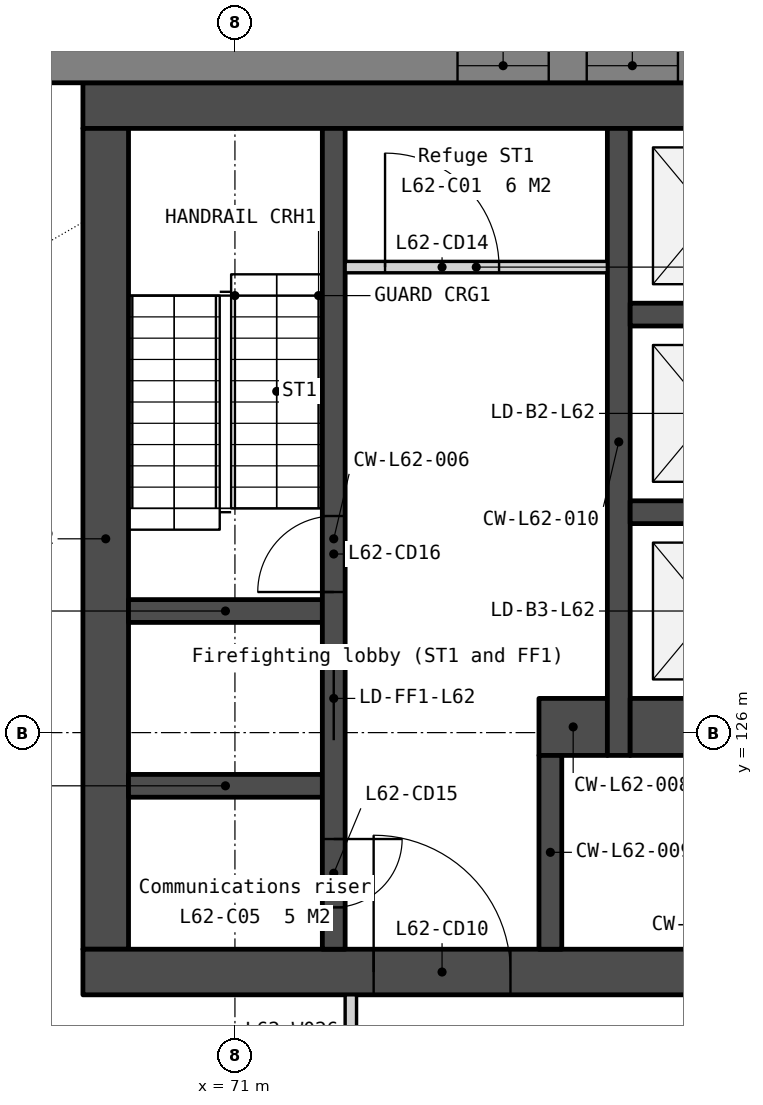
"""IFC4 building model, lengths in metres.
Left out: names, types, materials, properties, quantities, classifications, styles, units other than length and angle.
Written with IfcOpenShell. Run it as: python <this file> out.ifc"""

import sys

from ifc_helpers import new_model, si_unit, direction, frame, frame_2d, origin, place, context, subcontext, project, spatial, polyline, rectangle, outline, extrude, element, fill, save


model = new_model("IFC4")
c1 = context("Model", 3, precision=1e-05, world=origin(), true_north=direction((0.0, 1.0)))
c2 = subcontext(c1, "Body", "Model", "MODEL_VIEW")
j1 = project(units=[si_unit("LENGTHUNIT", "METRE"), si_unit("PLANEANGLEUNIT", "RADIAN")], contexts=[c1])
p1 = place(None, origin())
s1 = spatial("IfcSite", under=j1, at=p1, CompositionType="ELEMENT")
p2 = place(p1, origin())
s2 = spatial("IfcBuilding", under=s1, at=p2, CompositionType="ELEMENT")
p3 = place(p2, frame((0.0, 0.0, 254.3)))
s3 = spatial("IfcBuildingStorey", under=s2, at=p3, CompositionType="ELEMENT", Elevation=254.3)
p4 = place(p3, frame((69.0, 134.25, 0.0), z_axis=(0.0, 0.0, 1.0), x_axis=(1.0, 0.0, 0.0)))
e1 = element("IfcWall", 1, at=p4, inside=s3, PredefinedType="SOLIDWALL", context=c2, shape_type="SweptSolid", body=[
    extrude(rectangle(XDim=22.0, YDim=0.6, at=frame_2d((11.0, 0.0))), origin(), (0.0, 0.0, 1.0), 3.75),
])
p5 = place(p3, frame((69.3, 133.95, 0.0), z_axis=(0.0, 0.0, 1.0), x_axis=(0.0, -1.0, 0.0)))
e2 = element("IfcWall", 2, at=p5, inside=s3, PredefinedType="SOLIDWALL", context=c2, shape_type="SweptSolid", body=[
    extrude(rectangle(XDim=10.8, YDim=0.6, at=frame_2d((5.4, 0.0))), origin(), (0.0, 0.0, 1.0), 3.75),
])
p6 = place(p3, frame((69.0, 122.85, 0.0), z_axis=(0.0, 0.0, 1.0), x_axis=(1.0, 0.0, 0.0)))
e3 = element("IfcWall", 3, at=p6, inside=s3, PredefinedType="SOLIDWALL", context=c2, shape_type="SweptSolid", body=[
    extrude(rectangle(XDim=22.0, YDim=0.6, at=frame_2d((11.0, 0.0))), origin(), (0.0, 0.0, 1.0), 3.75),
])
p7 = place(p6, frame((16.375, 0.0, 0.0)))
e4 = element("IfcOpeningElement", 4, at=p7, cuts=e3, PredefinedType="OPENING", context=c2, shape_type="SweptSolid", body=[
    extrude(rectangle(XDim=1.8, YDim=2.1, at=frame_2d((0.9, 1.05))), frame((0.0, 0.31, 0.0), z_axis=(0.0, -1.0, 0.0), x_axis=(1.0, 0.0, 0.0)), (0.0, 0.0, 1.0), 0.62),
])
p8 = place(p6, frame((3.825, 0.0, 0.0)))
e5 = element("IfcOpeningElement", 5, at=p8, cuts=e3, PredefinedType="OPENING", context=c2, shape_type="SweptSolid", body=[
    extrude(rectangle(XDim=1.8, YDim=2.1, at=frame_2d((0.9, 1.05))), frame((0.0, 0.31, 0.0), z_axis=(0.0, -1.0, 0.0), x_axis=(1.0, 0.0, 0.0)), (0.0, 0.0, 1.0), 0.62),
])
p9 = place(p6, frame((12.85, 0.0, 0.0)))
e6 = element("IfcOpeningElement", 6, at=p9, cuts=e3, PredefinedType="OPENING", context=c2, shape_type="SweptSolid", body=[
    extrude(rectangle(XDim=1.5, YDim=2.1, at=frame_2d((0.75, 1.05))), frame((0.0, 0.31, 0.0), z_axis=(0.0, -1.0, 0.0), x_axis=(1.0, 0.0, 0.0)), (0.0, 0.0, 1.0), 0.62),
])
for number, where, z_axis, x_axis in (
    (7, (69.6, 127.6, 0.0), (0.0, 0.0, 1.0), (1.0, 0.0, 0.0)),
    (8, (69.6, 125.3, 0.0), (0.0, 0.0, 1.0), (1.0, 0.0, 0.0)),
):
    element("IfcWall", number, at=place(p3, frame(where, z_axis=z_axis, x_axis=x_axis)), inside=s3, PredefinedType="SOLIDWALL", context=c2, shape_type="SweptSolid", body=[
        extrude(rectangle(XDim=2.55, YDim=0.3, at=frame_2d((1.275, 0.0))), origin(), (0.0, 0.0, 1.0), 3.75),
    ])
p10 = place(p3, frame((72.3, 133.95, 0.0), z_axis=(0.0, 0.0, 1.0), x_axis=(0.0, -1.0, 0.0)))
e9 = element("IfcWall", 9, at=p10, inside=s3, PredefinedType="SOLIDWALL", context=c2, shape_type="SweptSolid", body=[
    extrude(rectangle(XDim=10.8, YDim=0.3, at=frame_2d((5.4, 0.0))), origin(), (0.0, 0.0, 1.0), 3.75),
])
p11 = place(p10, frame((6.95, 0.0, 0.0)))
e10 = element("IfcOpeningElement", 10, at=p11, cuts=e9, PredefinedType="OPENING", context=c2, shape_type="SweptSolid", body=[
    extrude(rectangle(XDim=1.1, YDim=2.1, at=frame_2d((0.55, 1.05))), frame((0.0, 0.16, 0.0), z_axis=(0.0, -1.0, 0.0), x_axis=(1.0, 0.0, 0.0)), (0.0, 0.0, 1.0), 0.32),
])
p12 = place(p10, frame((9.35, 0.0, 0.0)))
e11 = element("IfcOpeningElement", 11, at=p12, cuts=e9, PredefinedType="OPENING", context=c2, shape_type="SweptSolid", body=[
    extrude(rectangle(XDim=0.9, YDim=2.1, at=frame_2d((0.45, 1.05))), frame((0.0, 0.16, 0.0), z_axis=(0.0, -1.0, 0.0), x_axis=(1.0, 0.0, 0.0)), (0.0, 0.0, 1.0), 0.32),
])
p13 = place(p10, frame((5.1, 0.0, 0.0)))
e12 = element("IfcOpeningElement", 12, at=p13, cuts=e9, PredefinedType="OPENING", context=c2, shape_type="SweptSolid", body=[
    extrude(rectangle(XDim=1.0, YDim=2.1, at=frame_2d((0.5, 1.05))), frame((0.0, 0.16, 0.0), z_axis=(0.0, -1.0, 0.0), x_axis=(1.0, 0.0, 0.0)), (0.0, 0.0, 1.0), 0.32),
])
p14 = place(p3, frame((72.45, 132.125, 0.0), z_axis=(0.0, 0.0, 1.0), x_axis=(1.0, 0.0, 0.0)))
e13 = element("IfcWall", 13, at=p14, inside=s3, PredefinedType="PARTITIONING", context=c2, shape_type="SweptSolid", body=[
    extrude(rectangle(XDim=3.45, YDim=0.15, at=frame_2d((1.725, 0.0))), origin(), (0.0, 0.0, 1.0), 3.75),
])
p15 = place(p14, frame((0.525, 0.0, 0.0)))
e14 = element("IfcOpeningElement", 14, at=p15, cuts=e13, PredefinedType="OPENING", context=c2, shape_type="SweptSolid", body=[
    extrude(rectangle(XDim=1.5, YDim=2.1, at=frame_2d((0.75, 1.05))), frame((0.0, 0.085, 0.0), z_axis=(0.0, -1.0, 0.0), x_axis=(1.0, 0.0, 0.0)), (0.0, 0.0, 1.0), 0.17),
])
p16 = place(p3, frame((75.0, 126.075, 0.0), z_axis=(0.0, 0.0, 1.0), x_axis=(1.0, 0.0, 0.0)))
e15 = element("IfcWall", 15, at=p16, inside=s3, PredefinedType="SOLIDWALL", context=c2, shape_type="SweptSolid", body=[
    extrude(rectangle(XDim=0.9, YDim=0.75, at=frame_2d((0.45, 0.0))), origin(), (0.0, 0.0, 1.0), 3.75),
])
p17 = place(p3, frame((75.15, 125.7, 0.0), z_axis=(0.0, 0.0, 1.0), x_axis=(0.0, -1.0, 0.0)))
e16 = element("IfcWall", 16, at=p17, inside=s3, PredefinedType="SOLIDWALL", context=c2, shape_type="SweptSolid", body=[
    extrude(rectangle(XDim=2.55, YDim=0.3, at=frame_2d((1.275, 0.0))), origin(), (0.0, 0.0, 1.0), 3.75),
])
p18 = place(p3, frame((76.05, 133.95, 0.0), z_axis=(0.0, 0.0, 1.0), x_axis=(0.0, -1.0, 0.0)))
e17 = element("IfcWall", 17, at=p18, inside=s3, PredefinedType="SOLIDWALL", context=c2, shape_type="SweptSolid", body=[
    extrude(rectangle(XDim=8.25, YDim=0.3, at=frame_2d((4.125, 0.0))), origin(), (0.0, 0.0, 1.0), 3.75),
])
for number, where, z_axis, x_axis in (
    (18, (76.2, 131.5, 0.0), (0.0, 0.0, 1.0), (1.0, 0.0, 0.0)),
    (19, (76.2, 128.9, 0.0), (0.0, 0.0, 1.0), (1.0, 0.0, 0.0)),
):
    element("IfcWall", number, at=place(p3, frame(where, z_axis=z_axis, x_axis=x_axis)), inside=s3, PredefinedType="SOLIDWALL", context=c2, shape_type="SweptSolid", body=[
        extrude(rectangle(XDim=2.1, YDim=0.3, at=frame_2d((1.05, 0.0))), origin(), (0.0, 0.0, 1.0), 3.75),
    ])
p19 = place(p3, frame((76.2, 126.075, 0.0), z_axis=(0.0, 0.0, 1.0), x_axis=(1.0, 0.0, 0.0)))
e20 = element("IfcWall", 20, at=p19, inside=s3, PredefinedType="SOLIDWALL", context=c2, shape_type="SweptSolid", body=[
    extrude(rectangle(XDim=2.1, YDim=0.75, at=frame_2d((1.05, 0.0))), origin(), (0.0, 0.0, 1.0), 3.75),
])
p20 = place(p3, frame((98.486, 134.775, -0.15), z_axis=(0.0, 0.0, 1.0), x_axis=(-1.0, 0.0, 0.0)))
e21 = element("IfcWall", 21, at=p20, inside=s3, PredefinedType="SOLIDWALL", context=c2, shape_type="SweptSolid", body=[
    extrude(outline(polyline([(0.0, 0.0), (0.0, 3.9), (30.551, 3.9), (30.551, 0.0), (0.0, 0.0)])), frame((0.0, 0.225, 0.0), z_axis=(0.0, -1.0, 0.0), x_axis=(1.0, 0.0, 0.0)), (0.0, 0.0, 1.0), 0.45),
])
p21 = place(p20, frame((3.172, 0.0, 0.95)))
e22 = element("IfcOpeningElement", 22, at=p21, cuts=e21, PredefinedType="OPENING", context=c2, shape_type="SweptSolid", body=[
    extrude(rectangle(XDim=1.2, YDim=2.2, at=frame_2d((0.6, 1.1))), frame((0.0, 0.235, 0.0), z_axis=(0.0, -1.0, 0.0), x_axis=(1.0, 0.0, 0.0)), (0.0, 0.0, 1.0), 0.47),
])
p22 = place(p20, frame((4.872, 0.0, 0.95)))
e23 = element("IfcOpeningElement", 23, at=p22, cuts=e21, PredefinedType="OPENING", context=c2, shape_type="SweptSolid", body=[
    extrude(rectangle(XDim=1.2, YDim=2.2, at=frame_2d((0.6, 1.1))), frame((0.0, 0.235, 0.0), z_axis=(0.0, -1.0, 0.0), x_axis=(1.0, 0.0, 0.0)), (0.0, 0.0, 1.0), 0.47),
])
p23 = place(p20, frame((12.415, 0.0, 0.95)))
e24 = element("IfcOpeningElement", 24, at=p23, cuts=e21, PredefinedType="OPENING", context=c2, shape_type="SweptSolid", body=[
    extrude(rectangle(XDim=1.2, YDim=2.2, at=frame_2d((0.6, 1.1))), frame((0.0, 0.235, 0.0), z_axis=(0.0, -1.0, 0.0), x_axis=(1.0, 0.0, 0.0)), (0.0, 0.0, 1.0), 0.47),
])
p24 = place(p20, frame((14.115, 0.0, 0.95)))
e25 = element("IfcOpeningElement", 25, at=p24, cuts=e21, PredefinedType="OPENING", context=c2, shape_type="SweptSolid", body=[
    extrude(rectangle(XDim=1.2, YDim=2.2, at=frame_2d((0.6, 1.1))), frame((0.0, 0.235, 0.0), z_axis=(0.0, -1.0, 0.0), x_axis=(1.0, 0.0, 0.0)), (0.0, 0.0, 1.0), 0.47),
])
p25 = place(p20, frame((21.658, 0.0, 0.95)))
e26 = element("IfcOpeningElement", 26, at=p25, cuts=e21, PredefinedType="OPENING", context=c2, shape_type="SweptSolid", body=[
    extrude(rectangle(XDim=1.2, YDim=2.2, at=frame_2d((0.6, 1.1))), frame((0.0, 0.235, 0.0), z_axis=(0.0, -1.0, 0.0), x_axis=(1.0, 0.0, 0.0)), (0.0, 0.0, 1.0), 0.47),
])
p26 = place(p20, frame((23.358, 0.0, 0.95)))
e27 = element("IfcOpeningElement", 27, at=p26, cuts=e21, PredefinedType="OPENING", context=c2, shape_type="SweptSolid", body=[
    extrude(rectangle(XDim=1.2, YDim=2.2, at=frame_2d((0.6, 1.1))), frame((0.0, 0.235, 0.0), z_axis=(0.0, -1.0, 0.0), x_axis=(1.0, 0.0, 0.0)), (0.0, 0.0, 1.0), 0.47),
])
p27 = place(p3, frame((60.609, 133.207, -0.15), z_axis=(0.0, 0.0, 1.0), x_axis=(0.500002536638, -0.866023939251, 0.0)))
e28 = element("IfcWall", 28, at=p27, inside=s3, PredefinedType="SOLIDWALL", context=c2, shape_type="SweptSolid", body=[
    extrude(outline(polyline([(36.972, 0.0), (36.972, 3.9), (0.0, 3.9), (0.0, 0.0), (36.972, 0.0)])), frame((0.0, 0.225, 0.0), z_axis=(0.0, -1.0, 0.0), x_axis=(1.0, 0.0, 0.0)), (0.0, 0.0, 1.0), 0.45),
])
p28 = place(p27, frame((3.172, 0.0, 0.95)))
e29 = element("IfcOpeningElement", 29, at=p28, cuts=e28, PredefinedType="OPENING", context=c2, shape_type="SweptSolid", body=[
    extrude(rectangle(XDim=1.2, YDim=2.2, at=frame_2d((0.6, 1.1))), frame((0.0, 0.235, 0.0), z_axis=(0.0, -1.0, 0.0), x_axis=(1.0, 0.0, 0.0)), (0.0, 0.0, 1.0), 0.47),
])
p29 = place(p27, frame((4.872, 0.0, 0.95)))
e30 = element("IfcOpeningElement", 30, at=p29, cuts=e28, PredefinedType="OPENING", context=c2, shape_type="SweptSolid", body=[
    extrude(rectangle(XDim=1.2, YDim=2.2, at=frame_2d((0.6, 1.1))), frame((0.0, 0.235, 0.0), z_axis=(0.0, -1.0, 0.0), x_axis=(1.0, 0.0, 0.0)), (0.0, 0.0, 1.0), 0.47),
])
p30 = place(p27, frame((12.415, 0.0, 0.95)))
e31 = element("IfcOpeningElement", 31, at=p30, cuts=e28, PredefinedType="OPENING", context=c2, shape_type="SweptSolid", body=[
    extrude(rectangle(XDim=1.2, YDim=2.2, at=frame_2d((0.6, 1.1))), frame((0.0, 0.235, 0.0), z_axis=(0.0, -1.0, 0.0), x_axis=(1.0, 0.0, 0.0)), (0.0, 0.0, 1.0), 0.47),
])
p31 = place(p27, frame((14.115, 0.0, 0.95)))
e32 = element("IfcOpeningElement", 32, at=p31, cuts=e28, PredefinedType="OPENING", context=c2, shape_type="SweptSolid", body=[
    extrude(rectangle(XDim=1.2, YDim=2.2, at=frame_2d((0.6, 1.1))), frame((0.0, 0.235, 0.0), z_axis=(0.0, -1.0, 0.0), x_axis=(1.0, 0.0, 0.0)), (0.0, 0.0, 1.0), 0.47),
])
p32 = place(p27, frame((21.658, 0.0, 0.95)))
e33 = element("IfcOpeningElement", 33, at=p32, cuts=e28, PredefinedType="OPENING", context=c2, shape_type="SweptSolid", body=[
    extrude(rectangle(XDim=1.2, YDim=2.2, at=frame_2d((0.6, 1.1))), frame((0.0, 0.235, 0.0), z_axis=(0.0, -1.0, 0.0), x_axis=(1.0, 0.0, 0.0)), (0.0, 0.0, 1.0), 0.47),
])
p33 = place(p27, frame((23.358, 0.0, 0.95)))
e34 = element("IfcOpeningElement", 34, at=p33, cuts=e28, PredefinedType="OPENING", context=c2, shape_type="SweptSolid", body=[
    extrude(rectangle(XDim=1.2, YDim=2.2, at=frame_2d((0.6, 1.1))), frame((0.0, 0.235, 0.0), z_axis=(0.0, -1.0, 0.0), x_axis=(1.0, 0.0, 0.0)), (0.0, 0.0, 1.0), 0.47),
])
p34 = place(p27, frame((30.901, 0.0, 0.95)))
e35 = element("IfcOpeningElement", 35, at=p34, cuts=e28, PredefinedType="OPENING", context=c2, shape_type="SweptSolid", body=[
    extrude(rectangle(XDim=1.2, YDim=2.2, at=frame_2d((0.6, 1.1))), frame((0.0, 0.235, 0.0), z_axis=(0.0, -1.0, 0.0), x_axis=(1.0, 0.0, 0.0)), (0.0, 0.0, 1.0), 0.47),
])
p35 = place(p27, frame((32.601, 0.0, 0.95)))
e36 = element("IfcOpeningElement", 36, at=p35, cuts=e28, PredefinedType="OPENING", context=c2, shape_type="SweptSolid", body=[
    extrude(rectangle(XDim=1.2, YDim=2.2, at=frame_2d((0.6, 1.1))), frame((0.0, 0.235, 0.0), z_axis=(0.0, -1.0, 0.0), x_axis=(1.0, 0.0, 0.0)), (0.0, 0.0, 1.0), 0.47),
])
p36 = place(p3, frame((72.525, 120.05, 0.0), z_axis=(0.0, 0.0, 1.0), x_axis=(0.0, 1.0, 0.0)))
e37 = element("IfcWall", 37, at=p36, inside=s3, PredefinedType="PARTITIONING", context=c2, shape_type="SweptSolid", body=[
    extrude(rectangle(XDim=2.5, YDim=0.15, at=frame_2d((1.25, 0.0))), origin(), (0.0, 0.0, 1.0), 3.75),
])
p37 = place(p36, frame((0.75, 0.0, 0.0)))
e38 = element("IfcOpeningElement", 38, at=p37, cuts=e37, PredefinedType="OPENING", context=c2, shape_type="SweptSolid", body=[
    extrude(rectangle(XDim=1.0, YDim=2.1, at=frame_2d((0.5, 1.05))), frame((0.0, 0.085, 0.0), z_axis=(0.0, -1.0, 0.0), x_axis=(1.0, 0.0, 0.0)), (0.0, 0.0, 1.0), 0.17),
])
p38 = place(p11, origin())
e39 = element("IfcDoor", 39, at=p38, inside=s3, OperationType="SLIDING_TO_LEFT", PredefinedType="DOOR", context=c2, shape_type="SweptSolid", body=[
    extrude(rectangle(XDim=1.1, YDim=2.1, at=frame_2d((0.55, 1.05))), frame((0.0, 0.025, 0.0), z_axis=(0.0, -1.0, 0.0), x_axis=(1.0, 0.0, 0.0)), (0.0, 0.0, 1.0), 0.05),
])
fill(e10, e39)
p39 = place(p8, origin())
e40 = element("IfcDoor", 40, at=p39, inside=s3, OperationType="DOUBLE_DOOR_DOUBLE_SWING", PredefinedType="DOOR", context=c2, shape_type="SweptSolid", body=[
    extrude(rectangle(XDim=1.8, YDim=2.1, at=frame_2d((0.9, 1.05))), frame((0.0, 0.025, 0.0), z_axis=(0.0, -1.0, 0.0), x_axis=(1.0, 0.0, 0.0)), (0.0, 0.0, 1.0), 0.05),
])
fill(e5, e40)
p40 = place(p15, origin())
e41 = element("IfcDoor", 41, at=p40, inside=s3, OperationType="DOUBLE_DOOR_DOUBLE_SWING", PredefinedType="DOOR", context=c2, shape_type="SweptSolid", body=[
    extrude(rectangle(XDim=1.5, YDim=2.1, at=frame_2d((0.75, 1.05))), frame((0.0, 0.025, 0.0), z_axis=(0.0, -1.0, 0.0), x_axis=(1.0, 0.0, 0.0)), (0.0, 0.0, 1.0), 0.05),
])
fill(e14, e41)
p41 = place(p12, origin())
e42 = element("IfcDoor", 42, at=p41, inside=s3, OperationType="SINGLE_SWING_LEFT", PredefinedType="DOOR", context=c2, shape_type="SweptSolid", body=[
    extrude(rectangle(XDim=0.9, YDim=2.1, at=frame_2d((0.45, 1.05))), frame((0.0, 0.025, 0.0), z_axis=(0.0, -1.0, 0.0), x_axis=(1.0, 0.0, 0.0)), (0.0, 0.0, 1.0), 0.05),
])
fill(e11, e42)
p42 = place(p13, origin())
e43 = element("IfcDoor", 43, at=p42, inside=s3, OperationType="SINGLE_SWING_RIGHT", PredefinedType="DOOR", context=c2, shape_type="SweptSolid", body=[
    extrude(rectangle(XDim=1.0, YDim=2.1, at=frame_2d((0.5, 1.05))), frame((0.0, 0.025, 0.0), z_axis=(0.0, -1.0, 0.0), x_axis=(1.0, 0.0, 0.0)), (0.0, 0.0, 1.0), 0.05),
])
fill(e12, e43)
p43 = place(p25, origin())
e44 = element("IfcWindow", 44, at=p43, inside=s3, PartitioningType="SINGLE_PANEL", PredefinedType="WINDOW", context=c2, shape_type="SweptSolid", body=[
    extrude(rectangle(XDim=1.2, YDim=2.2, at=frame_2d((0.6, 1.1))), frame((0.0, 0.03, 0.0), z_axis=(0.0, -1.0, 0.0), x_axis=(1.0, 0.0, 0.0)), (0.0, 0.0, 1.0), 0.06),
])
fill(e26, e44)
p44 = place(p26, origin())
e45 = element("IfcWindow", 45, at=p44, inside=s3, PartitioningType="SINGLE_PANEL", PredefinedType="WINDOW", context=c2, shape_type="SweptSolid", body=[
    extrude(rectangle(XDim=1.2, YDim=2.2, at=frame_2d((0.6, 1.1))), frame((0.0, 0.03, 0.0), z_axis=(0.0, -1.0, 0.0), x_axis=(1.0, 0.0, 0.0)), (0.0, 0.0, 1.0), 0.06),
])
fill(e27, e45)
save(model, sys.argv[1])
